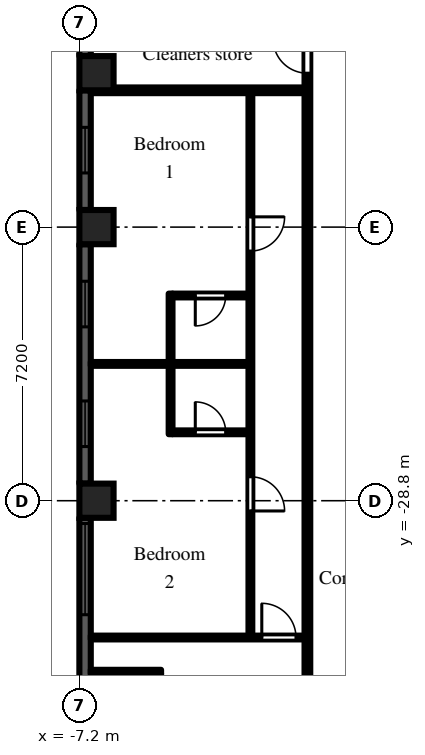
"""IFC4 building model, lengths in metres.
Left out: names, types, materials, properties, quantities, classifications, styles, units other than length and angle.
Written with IfcOpenShell. Run it as: python <this file> out.ifc"""

import sys

from ifc_helpers import new_model, si_unit, direction, frame, frame_2d, origin, origin_2d, place, context, subcontext, project, spatial, rectangle, extrude, element, fill, save


model = new_model("IFC4")
c1 = context("Model", 3, precision=1e-05, world=origin(), true_north=direction((0.0, 1.0)))
c2 = subcontext(c1, "Body", "Model", "MODEL_VIEW")
j1 = project(units=[si_unit("LENGTHUNIT", "METRE"), si_unit("PLANEANGLEUNIT", "RADIAN")], contexts=[c1])
p1 = place(None, origin())
s1 = spatial("IfcSite", under=j1, at=p1, CompositionType="ELEMENT")
p2 = place(p1, origin())
s2 = spatial("IfcBuilding", under=s1, at=p2, CompositionType="ELEMENT")
p3 = place(p2, frame((0.0, 0.0, 75.9)))
s3 = spatial("IfcBuildingStorey", under=s2, at=p3, CompositionType="ELEMENT", Elevation=75.9)
for number, where, z_axis, x_axis in (
    (1, (-6.75, -28.8, 0.0), (0.0, 0.0, 1.0), (1.0, 0.0, 0.0)),
    (2, (-6.75, -21.6, 0.0), (0.0, 0.0, 1.0), (1.0, 0.0, 0.0)),
    (3, (-6.75, -17.55, 0.0), (0.0, 0.0, 1.0), (1.0, 0.0, 0.0)),
):
    element("IfcColumn", number, at=place(p3, frame(where, z_axis=z_axis, x_axis=x_axis)), inside=s3, PredefinedType="COLUMN", context=c2, shape_type="SweptSolid", body=[
        extrude(rectangle(XDim=0.9, YDim=0.9, at=origin_2d()), origin(), (0.0, 0.0, 1.0), 3.0),
    ])
p4 = place(p3, frame((-7.05, -15.3, 0.0), z_axis=(0.0, 0.0, 1.0), x_axis=(0.0, -1.0, 0.0)))
e4 = element("IfcWall", 4, at=p4, inside=s3, PredefinedType="SOLIDWALL", context=c2, shape_type="SweptSolid", body=[
    extrude(rectangle(XDim=1.8, YDim=0.3, at=frame_2d((0.9, 0.0))), origin(), (0.0, 0.0, 1.0), 2.1),
])
p5 = place(p3, frame((-7.05, -18.0, 0.0), z_axis=(0.0, 0.0, 1.0), x_axis=(0.0, -1.0, 0.0)))
e5 = element("IfcWall", 5, at=p5, inside=s3, PredefinedType="SOLIDWALL", context=c2, shape_type="SweptSolid", body=[
    extrude(rectangle(XDim=3.15, YDim=0.3, at=frame_2d((1.575, 0.0))), origin(), (0.0, 0.0, 1.0), 2.1),
])
p6 = place(p5, frame((0.975, 0.0, 0.2)))
e6 = element("IfcOpeningElement", 6, at=p6, cuts=e5, PredefinedType="OPENING", context=c2, shape_type="SweptSolid", body=[
    extrude(rectangle(XDim=1.2, YDim=1.85, at=frame_2d((0.6, 0.925))), frame((0.0, 0.16, 0.0), z_axis=(0.0, -1.0, 0.0), x_axis=(1.0, 0.0, 0.0)), (0.0, 0.0, 1.0), 0.32),
])
p7 = place(p3, frame((-7.05, -22.05, 0.0), z_axis=(0.0, 0.0, 1.0), x_axis=(0.0, -1.0, 0.0)))
e7 = element("IfcWall", 7, at=p7, inside=s3, PredefinedType="SOLIDWALL", context=c2, shape_type="SweptSolid", body=[
    extrude(rectangle(XDim=6.3, YDim=0.3, at=frame_2d((3.15, 0.0))), origin(), (0.0, 0.0, 1.0), 2.1),
])
p8 = place(p7, frame((0.975, 0.0, 0.2)))
e8 = element("IfcOpeningElement", 8, at=p8, cuts=e7, PredefinedType="OPENING", context=c2, shape_type="SweptSolid", body=[
    extrude(rectangle(XDim=1.2, YDim=1.85, at=frame_2d((0.6, 0.925))), frame((0.0, 0.16, 0.0), z_axis=(0.0, -1.0, 0.0), x_axis=(1.0, 0.0, 0.0)), (0.0, 0.0, 1.0), 0.32),
])
p9 = place(p7, frame((4.125, 0.0, 0.2)))
e9 = element("IfcOpeningElement", 9, at=p9, cuts=e7, PredefinedType="OPENING", context=c2, shape_type="SweptSolid", body=[
    extrude(rectangle(XDim=1.2, YDim=1.85, at=frame_2d((0.6, 0.925))), frame((0.0, 0.16, 0.0), z_axis=(0.0, -1.0, 0.0), x_axis=(1.0, 0.0, 0.0)), (0.0, 0.0, 1.0), 0.32),
])
p10 = place(p3, frame((-7.05, -29.25, 0.0), z_axis=(0.0, 0.0, 1.0), x_axis=(0.0, -1.0, 0.0)))
e10 = element("IfcWall", 10, at=p10, inside=s3, PredefinedType="SOLIDWALL", context=c2, shape_type="SweptSolid", body=[
    extrude(rectangle(XDim=6.3, YDim=0.3, at=frame_2d((3.15, 0.0))), origin(), (0.0, 0.0, 1.0), 2.1),
])
p11 = place(p10, frame((0.15, 0.0, 0.2)))
e11 = element("IfcOpeningElement", 11, at=p11, cuts=e10, PredefinedType="OPENING", context=c2, shape_type="SweptSolid", body=[
    extrude(rectangle(XDim=2.4, YDim=1.85, at=frame_2d((1.2, 0.925))), frame((0.0, 0.16, 0.0), z_axis=(0.0, -1.0, 0.0), x_axis=(1.0, 0.0, 0.0)), (0.0, 0.0, 1.0), 0.32),
])
p12 = place(p3, frame((-6.9, -33.3, 0.0), z_axis=(0.0, 0.0, 1.0), x_axis=(1.0, 0.0, 0.0)))
e12 = element("IfcWall", 12, at=p12, inside=s3, PredefinedType="PARTITIONING", context=c2, shape_type="SweptSolid", body=[
    extrude(rectangle(XDim=1.85, YDim=0.1, at=frame_2d((0.925, 0.0))), origin(), (0.0, 0.0, 1.0), 2.575),
])
p13 = place(p3, frame((-6.9, -32.4, 0.0), z_axis=(0.0, 0.0, 1.0), x_axis=(1.0, 0.0, 0.0)))
e13 = element("IfcWall", 13, at=p13, inside=s3, PredefinedType="PARTITIONING", context=c2, shape_type="SweptSolid", body=[
    extrude(rectangle(XDim=5.625, YDim=0.1, at=frame_2d((2.812, 0.0))), origin(), (0.0, 0.0, 1.0), 2.575),
])
p14 = place(p13, frame((4.5, 0.0, 0.0)))
e14 = element("IfcOpeningElement", 14, at=p14, cuts=e13, PredefinedType="OPENING", context=c2, shape_type="SweptSolid", body=[
    extrude(rectangle(XDim=0.9, YDim=2.1, at=frame_2d((0.45, 1.05))), frame((0.0, 0.06, 0.0), z_axis=(0.0, -1.0, 0.0), x_axis=(1.0, 0.0, 0.0)), (0.0, 0.0, 1.0), 0.12),
])
p15 = place(p3, frame((-6.9, -25.2, 0.0), z_axis=(0.0, 0.0, 1.0), x_axis=(1.0, 0.0, 0.0)))
e15 = element("IfcWall", 15, at=p15, inside=s3, PredefinedType="PARTITIONING", context=c2, shape_type="SweptSolid", body=[
    extrude(rectangle(XDim=4.15, YDim=0.1, at=frame_2d((2.075, 0.0))), origin(), (0.0, 0.0, 1.0), 2.575),
])
p16 = place(p3, frame((-6.9, -18.0, 0.0), z_axis=(0.0, 0.0, 1.0), x_axis=(1.0, 0.0, 0.0)))
e16 = element("IfcWall", 16, at=p16, inside=s3, PredefinedType="PARTITIONING", context=c2, shape_type="SweptSolid", body=[
    extrude(rectangle(XDim=5.625, YDim=0.15, at=frame_2d((2.812, 0.0))), origin(), (0.0, 0.0, 1.0), 2.575),
])
p17 = place(p3, frame((-5.1, -35.05, 0.0), z_axis=(0.0, 0.0, 1.0), x_axis=(0.0, 1.0, 0.0)))
e17 = element("IfcWall", 17, at=p17, inside=s3, PredefinedType="PARTITIONING", context=c2, shape_type="SweptSolid", body=[
    extrude(rectangle(XDim=1.7, YDim=0.1, at=frame_2d((0.85, 0.0))), origin(), (0.0, 0.0, 1.0), 2.575),
])
p18 = place(p17, frame((0.45, 0.0, 0.0)))
e18 = element("IfcOpeningElement", 18, at=p18, cuts=e17, PredefinedType="OPENING", context=c2, shape_type="SweptSolid", body=[
    extrude(rectangle(XDim=0.8, YDim=2.1, at=frame_2d((0.4, 1.05))), frame((0.0, 0.06, 0.0), z_axis=(0.0, -1.0, 0.0), x_axis=(1.0, 0.0, 0.0)), (0.0, 0.0, 1.0), 0.12),
])
p19 = place(p3, frame((-4.8, -27.05, 0.0), z_axis=(0.0, 0.0, 1.0), x_axis=(0.0, 1.0, 0.0)))
e19 = element("IfcWall", 19, at=p19, inside=s3, PredefinedType="PARTITIONING", context=c2, shape_type="SweptSolid", body=[
    extrude(rectangle(XDim=3.7, YDim=0.1, at=frame_2d((1.85, 0.0))), origin(), (0.0, 0.0, 1.0), 2.575),
])
p20 = place(p3, frame((-4.75, -27.0, 0.0), z_axis=(0.0, 0.0, 1.0), x_axis=(1.0, 0.0, 0.0)))
e20 = element("IfcWall", 20, at=p20, inside=s3, PredefinedType="PARTITIONING", context=c2, shape_type="SweptSolid", body=[
    extrude(rectangle(XDim=2.0, YDim=0.1, at=frame_2d((1.0, 0.0))), origin(), (0.0, 0.0, 1.0), 2.575),
])
p21 = place(p20, frame((0.6, 0.0, 0.0)))
e21 = element("IfcOpeningElement", 21, at=p21, cuts=e20, PredefinedType="OPENING", context=c2, shape_type="SweptSolid", body=[
    extrude(rectangle(XDim=0.8, YDim=2.1, at=frame_2d((0.4, 1.05))), frame((0.0, 0.06, 0.0), z_axis=(0.0, -1.0, 0.0), x_axis=(1.0, 0.0, 0.0)), (0.0, 0.0, 1.0), 0.12),
])
p22 = place(p3, frame((-4.75, -23.4, 0.0), z_axis=(0.0, 0.0, 1.0), x_axis=(1.0, 0.0, 0.0)))
e22 = element("IfcWall", 22, at=p22, inside=s3, PredefinedType="PARTITIONING", context=c2, shape_type="SweptSolid", body=[
    extrude(rectangle(XDim=2.0, YDim=0.1, at=frame_2d((1.0, 0.0))), origin(), (0.0, 0.0, 1.0), 2.575),
])
p23 = place(p22, frame((0.6, 0.0, 0.0)))
e23 = element("IfcOpeningElement", 23, at=p23, cuts=e22, PredefinedType="OPENING", context=c2, shape_type="SweptSolid", body=[
    extrude(rectangle(XDim=0.8, YDim=2.1, at=frame_2d((0.4, 1.05))), frame((0.0, 0.06, 0.0), z_axis=(0.0, -1.0, 0.0), x_axis=(1.0, 0.0, 0.0)), (0.0, 0.0, 1.0), 0.12),
])
p24 = place(p3, frame((-2.7, -32.35, 0.0), z_axis=(0.0, 0.0, 1.0), x_axis=(0.0, 1.0, 0.0)))
e24 = element("IfcWall", 24, at=p24, inside=s3, PredefinedType="PARTITIONING", context=c2, shape_type="SweptSolid", body=[
    extrude(rectangle(XDim=14.275, YDim=0.1, at=frame_2d((7.138, 0.0))), origin(), (0.0, 0.0, 1.0), 2.575),
])
p25 = place(p24, frame((3.28, 0.0, 0.0)))
e25 = element("IfcOpeningElement", 25, at=p25, cuts=e24, PredefinedType="OPENING", context=c2, shape_type="SweptSolid", body=[
    extrude(rectangle(XDim=0.9, YDim=2.1, at=frame_2d((0.45, 1.05))), frame((0.0, 0.06, 0.0), z_axis=(0.0, -1.0, 0.0), x_axis=(1.0, 0.0, 0.0)), (0.0, 0.0, 1.0), 0.12),
])
p26 = place(p24, frame((10.12, 0.0, 0.0)))
e26 = element("IfcOpeningElement", 26, at=p26, cuts=e24, PredefinedType="OPENING", context=c2, shape_type="SweptSolid", body=[
    extrude(rectangle(XDim=0.9, YDim=2.1, at=frame_2d((0.45, 1.05))), frame((0.0, 0.06, 0.0), z_axis=(0.0, -1.0, 0.0), x_axis=(1.0, 0.0, 0.0)), (0.0, 0.0, 1.0), 0.12),
])
p27 = place(p3, frame((-1.2, -36.5, 0.0), z_axis=(0.0, 0.0, 1.0), x_axis=(0.0, 1.0, 0.0)))
e27 = element("IfcWall", 27, at=p27, inside=s3, PredefinedType="PARTITIONING", context=c2, shape_type="SweptSolid", body=[
    extrude(rectangle(XDim=35.225, YDim=0.15, at=frame_2d((17.613, 0.0))), origin(), (0.0, 0.0, 1.0), 2.575),
])
p28 = place(p27, frame((23.05, 0.0, 0.0)))
e28 = element("IfcOpeningElement", 28, at=p28, cuts=e27, PredefinedType="OPENING", context=c2, shape_type="SweptSolid", body=[
    extrude(rectangle(XDim=0.9, YDim=2.1, at=frame_2d((0.45, 1.05))), frame((0.0, 0.085, 0.0), z_axis=(0.0, -1.0, 0.0), x_axis=(1.0, 0.0, 0.0)), (0.0, 0.0, 1.0), 0.17),
])
p29 = place(p27, frame((26.65, 0.0, 0.0)))
e29 = element("IfcOpeningElement", 29, at=p29, cuts=e27, PredefinedType="OPENING", context=c2, shape_type="SweptSolid", body=[
    extrude(rectangle(XDim=0.9, YDim=2.1, at=frame_2d((0.45, 1.05))), frame((0.0, 0.085, 0.0), z_axis=(0.0, -1.0, 0.0), x_axis=(1.0, 0.0, 0.0)), (0.0, 0.0, 1.0), 0.17),
])
p30 = place(p27, frame((20.75, 0.0, 0.0)))
e30 = element("IfcOpeningElement", 30, at=p30, cuts=e27, PredefinedType="OPENING", context=c2, shape_type="SweptSolid", body=[
    extrude(rectangle(XDim=0.9, YDim=2.1, at=frame_2d((0.45, 1.05))), frame((0.0, 0.085, 0.0), z_axis=(0.0, -1.0, 0.0), x_axis=(1.0, 0.0, 0.0)), (0.0, 0.0, 1.0), 0.17),
])
p31 = place(p27, frame((18.95, 0.0, 0.0)))
e31 = element("IfcOpeningElement", 31, at=p31, cuts=e27, PredefinedType="OPENING", context=c2, shape_type="SweptSolid", body=[
    extrude(rectangle(XDim=0.9, YDim=2.1, at=frame_2d((0.45, 1.05))), frame((0.0, 0.085, 0.0), z_axis=(0.0, -1.0, 0.0), x_axis=(1.0, 0.0, 0.0)), (0.0, 0.0, 1.0), 0.17),
])
p32 = place(p27, frame((1.55, 0.0, 0.0)))
e32 = element("IfcOpeningElement", 32, at=p32, cuts=e27, PredefinedType="OPENING", context=c2, shape_type="SweptSolid", body=[
    extrude(rectangle(XDim=1.0, YDim=2.1, at=frame_2d((0.5, 1.05))), frame((0.0, 0.085, 0.0), z_axis=(0.0, -1.0, 0.0), x_axis=(1.0, 0.0, 0.0)), (0.0, 0.0, 1.0), 0.17),
])
p33 = place(p6, origin())
e33 = element("IfcWindow", 33, at=p33, inside=s3, PartitioningType="SINGLE_PANEL", PredefinedType="WINDOW", context=c2, shape_type="SweptSolid", body=[
    extrude(rectangle(XDim=1.2, YDim=1.85, at=frame_2d((0.6, 0.925))), frame((0.0, 0.03, 0.0), z_axis=(0.0, -1.0, 0.0), x_axis=(1.0, 0.0, 0.0)), (0.0, 0.0, 1.0), 0.06),
])
fill(e6, e33)
p34 = place(p8, origin())
e34 = element("IfcWindow", 34, at=p34, inside=s3, PartitioningType="SINGLE_PANEL", PredefinedType="WINDOW", context=c2, shape_type="SweptSolid", body=[
    extrude(rectangle(XDim=1.2, YDim=1.85, at=frame_2d((0.6, 0.925))), frame((0.0, 0.03, 0.0), z_axis=(0.0, -1.0, 0.0), x_axis=(1.0, 0.0, 0.0)), (0.0, 0.0, 1.0), 0.06),
])
fill(e8, e34)
p35 = place(p9, origin())
e35 = element("IfcWindow", 35, at=p35, inside=s3, PartitioningType="SINGLE_PANEL", PredefinedType="WINDOW", context=c2, shape_type="SweptSolid", body=[
    extrude(rectangle(XDim=1.2, YDim=1.85, at=frame_2d((0.6, 0.925))), frame((0.0, 0.03, 0.0), z_axis=(0.0, -1.0, 0.0), x_axis=(1.0, 0.0, 0.0)), (0.0, 0.0, 1.0), 0.06),
])
fill(e9, e35)
p36 = place(p11, origin())
e36 = element("IfcWindow", 36, at=p36, inside=s3, PartitioningType="SINGLE_PANEL", PredefinedType="WINDOW", context=c2, shape_type="SweptSolid", body=[
    extrude(rectangle(XDim=2.4, YDim=1.85, at=frame_2d((1.2, 0.925))), frame((0.0, 0.03, 0.0), z_axis=(0.0, -1.0, 0.0), x_axis=(1.0, 0.0, 0.0)), (0.0, 0.0, 1.0), 0.06),
])
fill(e11, e36)
p37 = place(p31, origin())
e37 = element("IfcDoor", 37, at=p37, inside=s3, OperationType="SINGLE_SWING_RIGHT", PredefinedType="DOOR", context=c2, shape_type="SweptSolid", body=[
    extrude(rectangle(XDim=0.9, YDim=2.1, at=frame_2d((0.45, 1.05))), frame((0.0, 0.025, 0.0), z_axis=(0.0, -1.0, 0.0), x_axis=(1.0, 0.0, 0.0)), (0.0, 0.0, 1.0), 0.05),
])
fill(e31, e37)
p38 = place(p25, frame((0.9, 0.0, 0.0), z_axis=(0.0, 0.0, 1.0), x_axis=(-1.0, 0.0, 0.0)))
e38 = element("IfcDoor", 38, at=p38, inside=s3, OperationType="SINGLE_SWING_RIGHT", PredefinedType="DOOR", context=c2, shape_type="SweptSolid", body=[
    extrude(rectangle(XDim=0.9, YDim=2.1, at=frame_2d((0.45, 1.05))), frame((0.0, 0.025, 0.0), z_axis=(0.0, -1.0, 0.0), x_axis=(1.0, 0.0, 0.0)), (0.0, 0.0, 1.0), 0.05),
])
fill(e25, e38)
p39 = place(p26, frame((0.9, 0.0, 0.0), z_axis=(0.0, 0.0, 1.0), x_axis=(-1.0, 0.0, 0.0)))
e39 = element("IfcDoor", 39, at=p39, inside=s3, OperationType="SINGLE_SWING_LEFT", PredefinedType="DOOR", context=c2, shape_type="SweptSolid", body=[
    extrude(rectangle(XDim=0.9, YDim=2.1, at=frame_2d((0.45, 1.05))), frame((0.0, 0.025, 0.0), z_axis=(0.0, -1.0, 0.0), x_axis=(1.0, 0.0, 0.0)), (0.0, 0.0, 1.0), 0.05),
])
fill(e26, e39)
p40 = place(p14, origin())
e40 = element("IfcDoor", 40, at=p40, inside=s3, OperationType="SINGLE_SWING_LEFT", PredefinedType="DOOR", context=c2, shape_type="SweptSolid", body=[
    extrude(rectangle(XDim=0.9, YDim=2.1, at=frame_2d((0.45, 1.05))), frame((0.0, 0.025, 0.0), z_axis=(0.0, -1.0, 0.0), x_axis=(1.0, 0.0, 0.0)), (0.0, 0.0, 1.0), 0.05),
])
fill(e14, e40)
p41 = place(p23, frame((0.8, 0.0, 0.0), z_axis=(0.0, 0.0, 1.0), x_axis=(-1.0, 0.0, 0.0)))
e41 = element("IfcDoor", 41, at=p41, inside=s3, OperationType="SINGLE_SWING_RIGHT", PredefinedType="DOOR", context=c2, shape_type="SweptSolid", body=[
    extrude(rectangle(XDim=0.8, YDim=2.1, at=frame_2d((0.4, 1.05))), frame((0.0, 0.025, 0.0), z_axis=(0.0, -1.0, 0.0), x_axis=(1.0, 0.0, 0.0)), (0.0, 0.0, 1.0), 0.05),
])
fill(e23, e41)
p42 = place(p21, origin())
e42 = element("IfcDoor", 42, at=p42, inside=s3, OperationType="SINGLE_SWING_LEFT", PredefinedType="DOOR", context=c2, shape_type="SweptSolid", body=[
    extrude(rectangle(XDim=0.8, YDim=2.1, at=frame_2d((0.4, 1.05))), frame((0.0, 0.025, 0.0), z_axis=(0.0, -1.0, 0.0), x_axis=(1.0, 0.0, 0.0)), (0.0, 0.0, 1.0), 0.05),
])
fill(e21, e42)
save(model, sys.argv[1])
